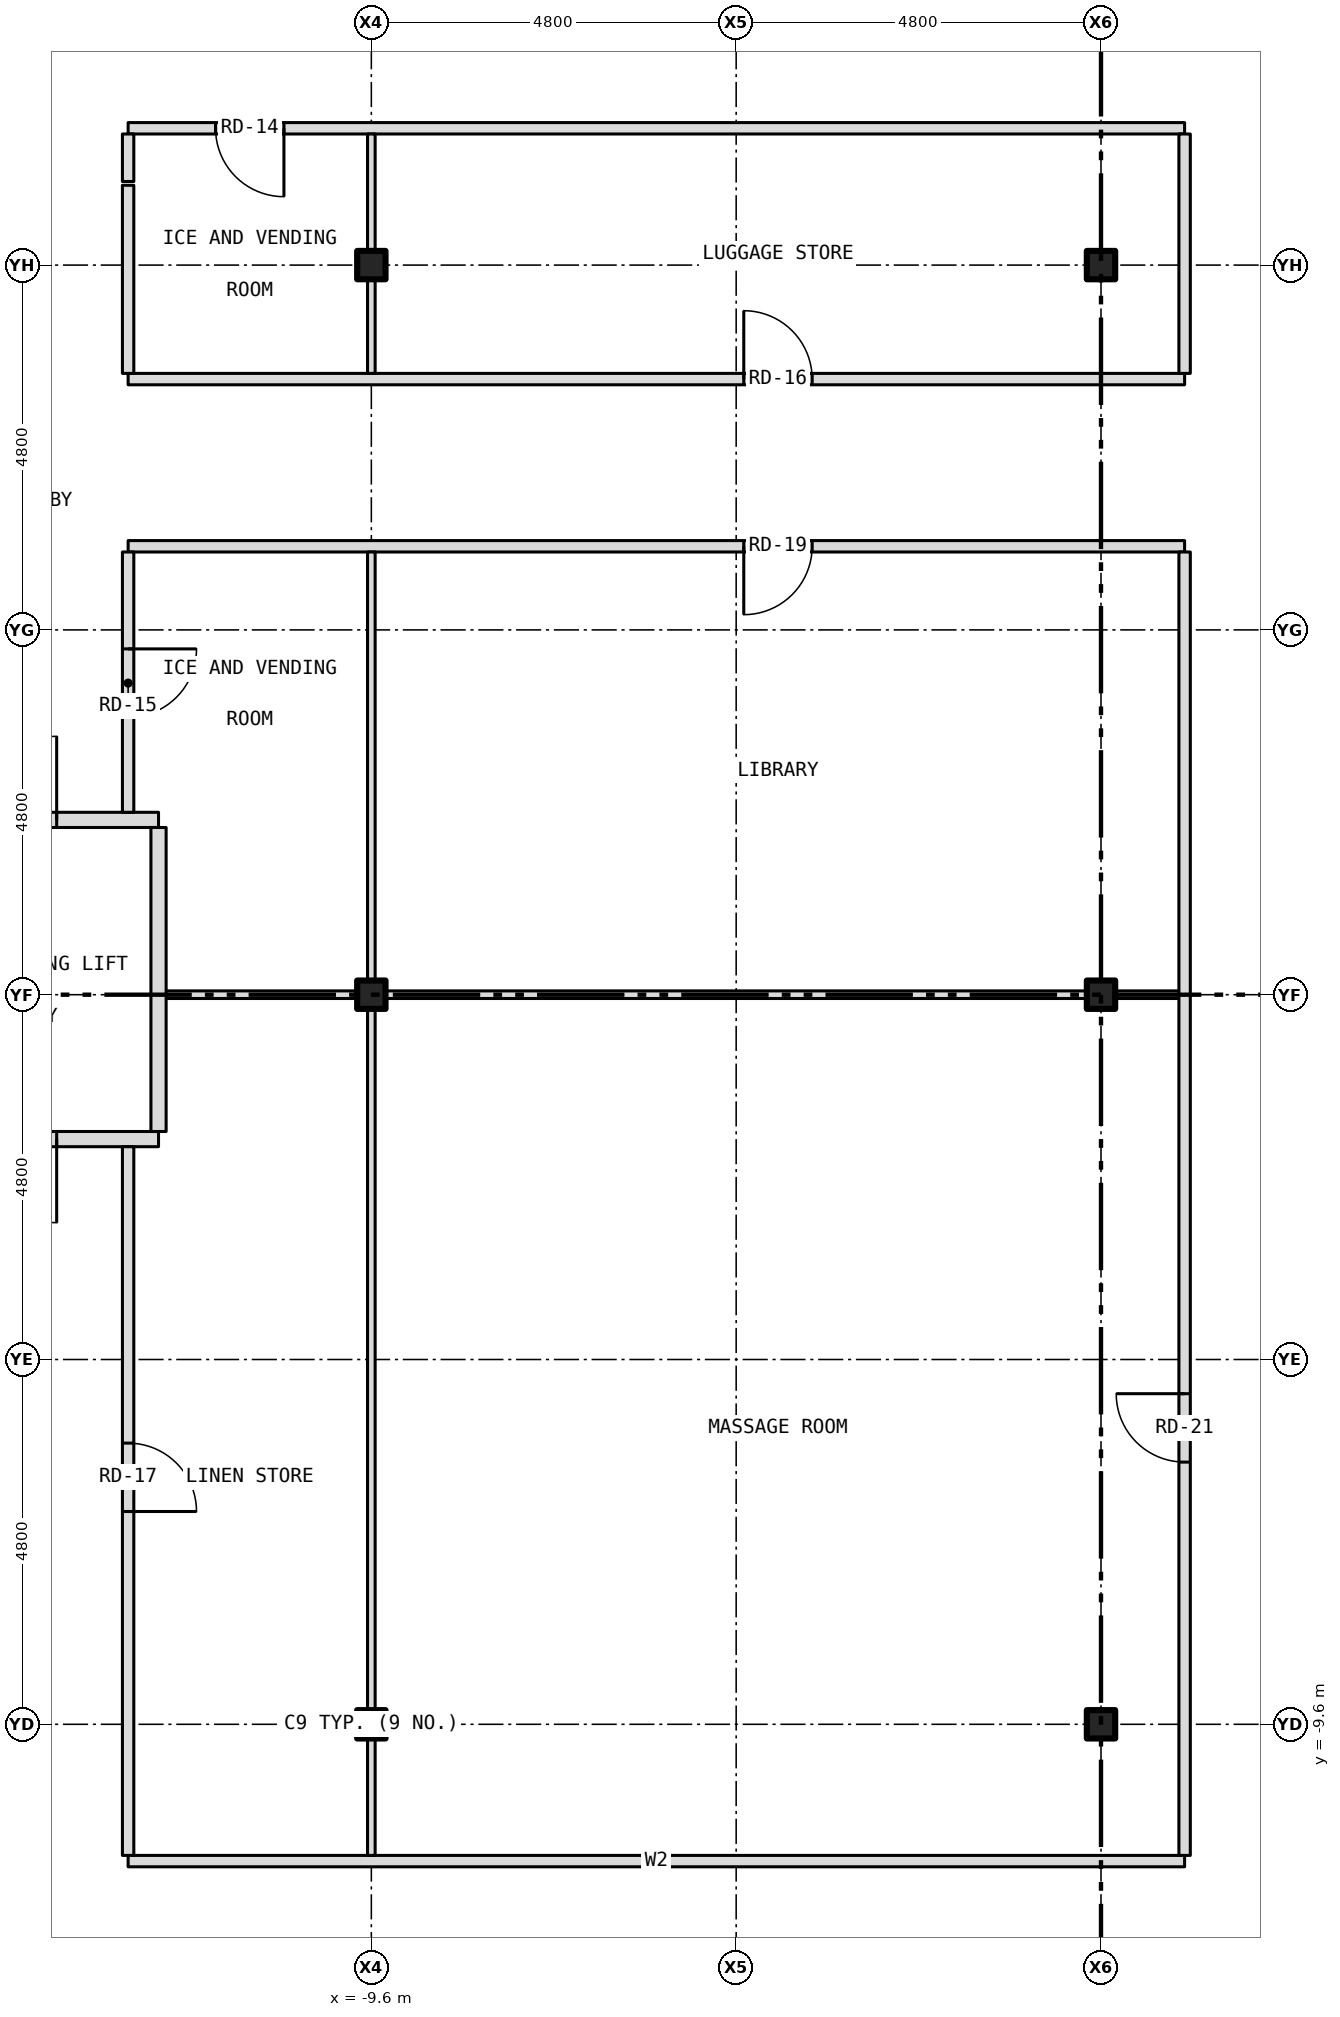
"""IFC4 building model, lengths in metres.
Left out: names, types, materials, properties, quantities, classifications, styles, units other than length and angle.
Written with IfcOpenShell. Run it as: python <this file> out.ifc"""

import sys

from ifc_helpers import new_model, si_unit, direction, frame, frame_2d, origin, origin_2d, place, context, subcontext, project, spatial, rectangle, i_section, extrude, element, fill, save


model = new_model("IFC4")
c1 = context("Model", 3, precision=1e-05, world=origin(), true_north=direction((0.0, 1.0)))
c2 = subcontext(c1, "Body", "Model", "MODEL_VIEW")
j1 = project(units=[si_unit("LENGTHUNIT", "METRE"), si_unit("PLANEANGLEUNIT", "RADIAN")], contexts=[c1])
p1 = place(None, origin())
s1 = spatial("IfcSite", under=j1, at=p1, CompositionType="ELEMENT")
p2 = place(p1, origin())
s2 = spatial("IfcBuilding", under=s1, at=p2, CompositionType="ELEMENT")
p3 = place(p2, frame((0.0, 0.0, 165.5)))
s3 = spatial("IfcBuildingStorey", under=s2, at=p3, CompositionType="ELEMENT", Elevation=165.5)
for number, where, z_axis, x_axis in (
    (1, (-9.6, -9.6, -0.15), (0.0, 0.0, 1.0), (1.0, 0.0, 0.0)),
    (2, (-9.6, 0.0, -0.15), (0.0, 0.0, 1.0), (1.0, 0.0, 0.0)),
    (3, (-9.6, 9.6, -0.15), (0.0, 0.0, 1.0), (1.0, 0.0, 0.0)),
    (4, (0.0, -9.6, -0.15), (0.0, 0.0, 1.0), (1.0, 0.0, 0.0)),
    (5, (0.0, 0.0, -0.15), (0.0, 0.0, 1.0), (1.0, 0.0, 0.0)),
    (6, (0.0, 9.6, -0.15), (0.0, 0.0, 1.0), (1.0, 0.0, 0.0)),
):
    element("IfcColumn", number, at=place(p3, frame(where, z_axis=z_axis, x_axis=x_axis)), inside=s3, PredefinedType="COLUMN", context=c2, shape_type="SweptSolid", body=[
        extrude(i_section(OverallWidth=0.373, OverallDepth=0.373, WebThickness=0.016, FlangeThickness=0.026, at=origin_2d()), origin(), (0.0, 0.0, 1.0), 3.5),
    ])
p4 = place(p3, frame((-12.8, -11.4, 0.0), z_axis=(0.0, 0.0, 1.0), x_axis=(1.0, 0.0, 0.0)))
e7 = element("IfcWall", 7, at=p4, inside=s3, PredefinedType="PARTITIONING", context=c2, shape_type="SweptSolid", body=[
    extrude(rectangle(XDim=13.9, YDim=0.15, at=frame_2d((6.95, 0.0))), origin(), (0.0, 0.0, 1.0), 3.35),
])
p5 = place(p3, frame((-15.68, -1.9, 0.0), z_axis=(0.0, 0.0, 1.0), x_axis=(1.0, 0.0, 0.0)))
e8 = element("IfcWall", 8, at=p5, inside=s3, PredefinedType="PARTITIONING", context=c2, shape_type="SweptSolid", body=[
    extrude(rectangle(XDim=3.28, YDim=0.2, at=frame_2d((1.64, 0.0))), origin(), (0.0, 0.0, 1.0), 3.35),
])
p6 = place(p5, frame((0.84, 0.0, 0.0)))
e9 = element("IfcOpeningElement", 9, at=p6, cuts=e8, PredefinedType="OPENING", context=c2, shape_type="SweptSolid", body=[
    extrude(rectangle(XDim=1.1, YDim=2.1, at=frame_2d((0.55, 1.05))), frame((0.0, 0.112, 0.0), z_axis=(0.0, -1.0, 0.0), x_axis=(1.0, 0.0, 0.0)), (0.0, 0.0, 1.0), 0.224),
])
p7 = place(p3, frame((-12.4, 0.0, 0.0), z_axis=(0.0, 0.0, 1.0), x_axis=(1.0, 0.0, 0.0)))
e10 = element("IfcWall", 10, at=p7, inside=s3, PredefinedType="PARTITIONING", context=c2, shape_type="SweptSolid", body=[
    extrude(rectangle(XDim=2.613, YDim=0.1, at=frame_2d((1.306, 0.0))), origin(), (0.0, 0.0, 1.0), 2.728),
])
p8 = place(p3, frame((-9.787, 0.0, 0.0), z_axis=(0.0, 0.0, 1.0), x_axis=(1.0, 0.0, 0.0)))
e11 = element("IfcWall", 11, at=p8, inside=s3, PredefinedType="PARTITIONING", context=c2, shape_type="SweptSolid", body=[
    extrude(rectangle(XDim=0.374, YDim=0.1, at=frame_2d((0.187, 0.0))), origin(), (0.0, 0.0, 1.0), 3.35),
])
p9 = place(p3, frame((-9.413, 0.0, 0.0), z_axis=(0.0, 0.0, 1.0), x_axis=(1.0, 0.0, 0.0)))
e12 = element("IfcWall", 12, at=p9, inside=s3, PredefinedType="PARTITIONING", context=c2, shape_type="SweptSolid", body=[
    extrude(rectangle(XDim=9.226, YDim=0.1, at=frame_2d((4.613, 0.0))), origin(), (0.0, 0.0, 1.0), 2.728),
])
p10 = place(p3, frame((-0.187, 0.0, 0.0), z_axis=(0.0, 0.0, 1.0), x_axis=(1.0, 0.0, 0.0)))
e13 = element("IfcWall", 13, at=p10, inside=s3, PredefinedType="PARTITIONING", context=c2, shape_type="SweptSolid", body=[
    extrude(rectangle(XDim=0.374, YDim=0.1, at=frame_2d((0.187, 0.0))), origin(), (0.0, 0.0, 1.0), 3.35),
])
p11 = place(p3, frame((0.187, 0.0, 0.0), z_axis=(0.0, 0.0, 1.0), x_axis=(1.0, 0.0, 0.0)))
e14 = element("IfcWall", 14, at=p11, inside=s3, PredefinedType="PARTITIONING", context=c2, shape_type="SweptSolid", body=[
    extrude(rectangle(XDim=0.913, YDim=0.1, at=frame_2d((0.457, 0.0))), origin(), (0.0, 0.0, 1.0), 2.728),
])
p12 = place(p3, frame((-15.68, 2.3, 0.0), z_axis=(0.0, 0.0, 1.0), x_axis=(1.0, 0.0, 0.0)))
e15 = element("IfcWall", 15, at=p12, inside=s3, PredefinedType="PARTITIONING", context=c2, shape_type="SweptSolid", body=[
    extrude(rectangle(XDim=3.28, YDim=0.2, at=frame_2d((1.64, 0.0))), origin(), (0.0, 0.0, 1.0), 3.35),
])
p13 = place(p12, frame((0.84, 0.0, 0.0)))
e16 = element("IfcOpeningElement", 16, at=p13, cuts=e15, PredefinedType="OPENING", context=c2, shape_type="SweptSolid", body=[
    extrude(rectangle(XDim=1.1, YDim=2.1, at=frame_2d((0.55, 1.05))), frame((0.0, 0.112, 0.0), z_axis=(0.0, -1.0, 0.0), x_axis=(1.0, 0.0, 0.0)), (0.0, 0.0, 1.0), 0.224),
])
p14 = place(p3, frame((-12.8, 5.9, 0.0), z_axis=(0.0, 0.0, 1.0), x_axis=(1.0, 0.0, 0.0)))
e17 = element("IfcWall", 17, at=p14, inside=s3, PredefinedType="PARTITIONING", context=c2, shape_type="SweptSolid", body=[
    extrude(rectangle(XDim=13.9, YDim=0.15, at=frame_2d((6.95, 0.0))), origin(), (0.0, 0.0, 1.0), 3.35),
])
p15 = place(p14, frame((8.1, 0.0, 0.0)))
e18 = element("IfcOpeningElement", 18, at=p15, cuts=e17, PredefinedType="OPENING", context=c2, shape_type="SweptSolid", body=[
    extrude(rectangle(XDim=0.9, YDim=2.1, at=frame_2d((0.45, 1.05))), frame((0.0, 0.087, 0.0), z_axis=(0.0, -1.0, 0.0), x_axis=(1.0, 0.0, 0.0)), (0.0, 0.0, 1.0), 0.174),
])
p16 = place(p3, frame((-12.8, 8.1, 0.0), z_axis=(0.0, 0.0, 1.0), x_axis=(1.0, 0.0, 0.0)))
e19 = element("IfcWall", 19, at=p16, inside=s3, PredefinedType="PARTITIONING", context=c2, shape_type="SweptSolid", body=[
    extrude(rectangle(XDim=13.9, YDim=0.15, at=frame_2d((6.95, 0.0))), origin(), (0.0, 0.0, 1.0), 3.35),
])
p17 = place(p16, frame((8.1, 0.0, 0.0)))
e20 = element("IfcOpeningElement", 20, at=p17, cuts=e19, PredefinedType="OPENING", context=c2, shape_type="SweptSolid", body=[
    extrude(rectangle(XDim=0.9, YDim=2.1, at=frame_2d((0.45, 1.05))), frame((0.0, 0.087, 0.0), z_axis=(0.0, -1.0, 0.0), x_axis=(1.0, 0.0, 0.0)), (0.0, 0.0, 1.0), 0.174),
])
p18 = place(p3, frame((-12.8, 11.4, 0.0), z_axis=(0.0, 0.0, 1.0), x_axis=(1.0, 0.0, 0.0)))
e21 = element("IfcWall", 21, at=p18, inside=s3, PredefinedType="PARTITIONING", context=c2, shape_type="SweptSolid", body=[
    extrude(rectangle(XDim=13.9, YDim=0.15, at=frame_2d((6.95, 0.0))), origin(), (0.0, 0.0, 1.0), 3.35),
])
p19 = place(p18, frame((1.15, 0.0, 0.0)))
e22 = element("IfcOpeningElement", 22, at=p19, cuts=e21, PredefinedType="OPENING", context=c2, shape_type="SweptSolid", body=[
    extrude(rectangle(XDim=0.9, YDim=2.1, at=frame_2d((0.45, 1.05))), frame((0.0, 0.087, 0.0), z_axis=(0.0, -1.0, 0.0), x_axis=(1.0, 0.0, 0.0)), (0.0, 0.0, 1.0), 0.174),
])
p20 = place(p3, frame((-12.8, -11.325, 0.0), z_axis=(0.0, 0.0, 1.0), x_axis=(0.0, 1.0, 0.0)))
e23 = element("IfcWall", 23, at=p20, inside=s3, PredefinedType="PARTITIONING", context=c2, shape_type="SweptSolid", body=[
    extrude(rectangle(XDim=9.325, YDim=0.15, at=frame_2d((4.663, 0.0))), origin(), (0.0, 0.0, 1.0), 3.35),
])
p21 = place(p20, frame((4.525, 0.0, 0.0)))
e24 = element("IfcOpeningElement", 24, at=p21, cuts=e23, PredefinedType="OPENING", context=c2, shape_type="SweptSolid", body=[
    extrude(rectangle(XDim=0.9, YDim=2.1, at=frame_2d((0.45, 1.05))), frame((0.0, 0.087, 0.0), z_axis=(0.0, -1.0, 0.0), x_axis=(1.0, 0.0, 0.0)), (0.0, 0.0, 1.0), 0.174),
])
p22 = place(p3, frame((-12.8, 2.4, 0.0), z_axis=(0.0, 0.0, 1.0), x_axis=(0.0, 1.0, 0.0)))
e25 = element("IfcWall", 25, at=p22, inside=s3, PredefinedType="PARTITIONING", context=c2, shape_type="SweptSolid", body=[
    extrude(rectangle(XDim=3.425, YDim=0.15, at=frame_2d((1.712, 0.0))), origin(), (0.0, 0.0, 1.0), 3.35),
])
p23 = place(p22, frame((1.25, 0.0, 0.0)))
e26 = element("IfcOpeningElement", 26, at=p23, cuts=e25, PredefinedType="OPENING", context=c2, shape_type="SweptSolid", body=[
    extrude(rectangle(XDim=0.9, YDim=2.1, at=frame_2d((0.45, 1.05))), frame((0.0, 0.087, 0.0), z_axis=(0.0, -1.0, 0.0), x_axis=(1.0, 0.0, 0.0)), (0.0, 0.0, 1.0), 0.174),
])
p24 = place(p3, frame((-12.8, 8.175, 0.0), z_axis=(0.0, 0.0, 1.0), x_axis=(0.0, 1.0, 0.0)))
e27 = element("IfcWall", 27, at=p24, inside=s3, PredefinedType="PARTITIONING", context=c2, shape_type="SweptSolid", body=[
    extrude(rectangle(XDim=2.475, YDim=0.15, at=frame_2d((1.237, 0.0))), origin(), (0.0, 0.0, 1.0), 3.35),
])
p25 = place(p3, frame((-12.8, 10.7, 0.0), z_axis=(0.0, 0.0, 1.0), x_axis=(0.0, 1.0, 0.0)))
e28 = element("IfcWall", 28, at=p25, inside=s3, PredefinedType="PARTITIONING", context=c2, shape_type="SweptSolid", body=[
    extrude(rectangle(XDim=0.625, YDim=0.15, at=frame_2d((0.312, 0.0))), origin(), (0.0, 0.0, 1.0), 3.35),
])
p26 = place(p3, frame((-12.4, -1.8, 0.0), z_axis=(0.0, 0.0, 1.0), x_axis=(0.0, 1.0, 0.0)))
e29 = element("IfcWall", 29, at=p26, inside=s3, PredefinedType="PARTITIONING", context=c2, shape_type="SweptSolid", body=[
    extrude(rectangle(XDim=4.0, YDim=0.2, at=frame_2d((2.0, 0.0))), origin(), (0.0, 0.0, 1.0), 3.35),
])
p27 = place(p3, frame((-9.6, -11.325, 0.0), z_axis=(0.0, 0.0, 1.0), x_axis=(0.0, 1.0, 0.0)))
e30 = element("IfcWall", 30, at=p27, inside=s3, PredefinedType="PARTITIONING", context=c2, shape_type="SweptSolid", body=[
    extrude(rectangle(XDim=1.538, YDim=0.1, at=frame_2d((0.769, 0.0))), origin(), (0.0, 0.0, 1.0), 2.728),
])
p28 = place(p3, frame((-9.6, -9.787, 0.0), z_axis=(0.0, 0.0, 1.0), x_axis=(0.0, 1.0, 0.0)))
e31 = element("IfcWall", 31, at=p28, inside=s3, PredefinedType="PARTITIONING", context=c2, shape_type="SweptSolid", body=[
    extrude(rectangle(XDim=0.374, YDim=0.1, at=frame_2d((0.187, 0.0))), origin(), (0.0, 0.0, 1.0), 3.35),
])
p29 = place(p3, frame((-9.6, -9.413, 0.0), z_axis=(0.0, 0.0, 1.0), x_axis=(0.0, 1.0, 0.0)))
e32 = element("IfcWall", 32, at=p29, inside=s3, PredefinedType="PARTITIONING", context=c2, shape_type="SweptSolid", body=[
    extrude(rectangle(XDim=9.363, YDim=0.1, at=frame_2d((4.682, 0.0))), origin(), (0.0, 0.0, 1.0), 2.728),
])
p30 = place(p3, frame((-9.6, 0.05, 0.0), z_axis=(0.0, 0.0, 1.0), x_axis=(0.0, 1.0, 0.0)))
e33 = element("IfcWall", 33, at=p30, inside=s3, PredefinedType="PARTITIONING", context=c2, shape_type="SweptSolid", body=[
    extrude(rectangle(XDim=5.775, YDim=0.1, at=frame_2d((2.887, 0.0))), origin(), (0.0, 0.0, 1.0), 2.728),
])
p31 = place(p3, frame((-9.6, 8.175, 0.0), z_axis=(0.0, 0.0, 1.0), x_axis=(0.0, 1.0, 0.0)))
e34 = element("IfcWall", 34, at=p31, inside=s3, PredefinedType="PARTITIONING", context=c2, shape_type="SweptSolid", body=[
    extrude(rectangle(XDim=1.238, YDim=0.1, at=frame_2d((0.619, 0.0))), origin(), (0.0, 0.0, 1.0), 2.728),
])
p32 = place(p3, frame((-9.6, 9.413, 0.0), z_axis=(0.0, 0.0, 1.0), x_axis=(0.0, 1.0, 0.0)))
e35 = element("IfcWall", 35, at=p32, inside=s3, PredefinedType="PARTITIONING", context=c2, shape_type="SweptSolid", body=[
    extrude(rectangle(XDim=0.374, YDim=0.1, at=frame_2d((0.187, 0.0))), origin(), (0.0, 0.0, 1.0), 3.35),
])
p33 = place(p3, frame((-9.6, 9.787, 0.0), z_axis=(0.0, 0.0, 1.0), x_axis=(0.0, 1.0, 0.0)))
e36 = element("IfcWall", 36, at=p33, inside=s3, PredefinedType="PARTITIONING", context=c2, shape_type="SweptSolid", body=[
    extrude(rectangle(XDim=1.538, YDim=0.1, at=frame_2d((0.769, 0.0))), origin(), (0.0, 0.0, 1.0), 2.728),
])
p34 = place(p3, frame((1.1, -11.325, 0.0), z_axis=(0.0, 0.0, 1.0), x_axis=(0.0, 1.0, 0.0)))
e37 = element("IfcWall", 37, at=p34, inside=s3, PredefinedType="PARTITIONING", context=c2, shape_type="SweptSolid", body=[
    extrude(rectangle(XDim=17.15, YDim=0.15, at=frame_2d((8.575, 0.0))), origin(), (0.0, 0.0, 1.0), 3.35),
])
p35 = place(p34, frame((5.175, 0.0, 0.0)))
e38 = element("IfcOpeningElement", 38, at=p35, cuts=e37, PredefinedType="OPENING", context=c2, shape_type="SweptSolid", body=[
    extrude(rectangle(XDim=0.9, YDim=2.1, at=frame_2d((0.45, 1.05))), frame((0.0, 0.087, 0.0), z_axis=(0.0, -1.0, 0.0), x_axis=(1.0, 0.0, 0.0)), (0.0, 0.0, 1.0), 0.174),
])
p36 = place(p3, frame((1.1, 8.175, 0.0), z_axis=(0.0, 0.0, 1.0), x_axis=(0.0, 1.0, 0.0)))
e39 = element("IfcWall", 39, at=p36, inside=s3, PredefinedType="PARTITIONING", context=c2, shape_type="SweptSolid", body=[
    extrude(rectangle(XDim=3.15, YDim=0.15, at=frame_2d((1.575, 0.0))), origin(), (0.0, 0.0, 1.0), 3.35),
])
p37 = place(p13, origin())
e40 = element("IfcDoor", 40, at=p37, inside=s3, OperationType="SINGLE_SWING_RIGHT", PredefinedType="DOOR", context=c2, shape_type="SweptSolid", body=[
    extrude(rectangle(XDim=1.1, YDim=2.1, at=frame_2d((0.55, 1.05))), frame((0.0, 0.025, 0.0), z_axis=(0.0, -1.0, 0.0), x_axis=(1.0, 0.0, 0.0)), (0.0, 0.0, 1.0), 0.05),
])
fill(e16, e40)
p38 = place(p6, origin())
e41 = element("IfcDoor", 41, at=p38, inside=s3, OperationType="SINGLE_SWING_RIGHT", PredefinedType="DOOR", context=c2, shape_type="SweptSolid", body=[
    extrude(rectangle(XDim=1.1, YDim=2.1, at=frame_2d((0.55, 1.05))), frame((0.0, 0.025, 0.0), z_axis=(0.0, -1.0, 0.0), x_axis=(1.0, 0.0, 0.0)), (0.0, 0.0, 1.0), 0.05),
])
fill(e9, e41)
p39 = place(p19, origin())
e42 = element("IfcDoor", 42, at=p39, inside=s3, OperationType="SINGLE_SWING_RIGHT", PredefinedType="DOOR", context=c2, shape_type="SweptSolid", body=[
    extrude(rectangle(XDim=0.9, YDim=2.1, at=frame_2d((0.45, 1.05))), frame((0.0, 0.025, 0.0), z_axis=(0.0, -1.0, 0.0), x_axis=(1.0, 0.0, 0.0)), (0.0, 0.0, 1.0), 0.05),
])
fill(e22, e42)
p40 = place(p23, origin())
e43 = element("IfcDoor", 43, at=p40, inside=s3, OperationType="SINGLE_SWING_RIGHT", PredefinedType="DOOR", context=c2, shape_type="SweptSolid", body=[
    extrude(rectangle(XDim=0.9, YDim=2.1, at=frame_2d((0.45, 1.05))), frame((0.0, 0.025, 0.0), z_axis=(0.0, -1.0, 0.0), x_axis=(1.0, 0.0, 0.0)), (0.0, 0.0, 1.0), 0.05),
])
fill(e26, e43)
p41 = place(p17, origin())
e44 = element("IfcDoor", 44, at=p41, inside=s3, OperationType="SINGLE_SWING_LEFT", PredefinedType="DOOR", context=c2, shape_type="SweptSolid", body=[
    extrude(rectangle(XDim=0.9, YDim=2.1, at=frame_2d((0.45, 1.05))), frame((0.0, 0.025, 0.0), z_axis=(0.0, -1.0, 0.0), x_axis=(1.0, 0.0, 0.0)), (0.0, 0.0, 1.0), 0.05),
])
fill(e20, e44)
p42 = place(p21, origin())
e45 = element("IfcDoor", 45, at=p42, inside=s3, OperationType="SINGLE_SWING_LEFT", PredefinedType="DOOR", context=c2, shape_type="SweptSolid", body=[
    extrude(rectangle(XDim=0.9, YDim=2.1, at=frame_2d((0.45, 1.05))), frame((0.0, 0.025, 0.0), z_axis=(0.0, -1.0, 0.0), x_axis=(1.0, 0.0, 0.0)), (0.0, 0.0, 1.0), 0.05),
])
fill(e24, e45)
p43 = place(p15, origin())
e46 = element("IfcDoor", 46, at=p43, inside=s3, OperationType="SINGLE_SWING_LEFT", PredefinedType="DOOR", context=c2, shape_type="SweptSolid", body=[
    extrude(rectangle(XDim=0.9, YDim=2.1, at=frame_2d((0.45, 1.05))), frame((0.0, 0.025, 0.0), z_axis=(0.0, -1.0, 0.0), x_axis=(1.0, 0.0, 0.0)), (0.0, 0.0, 1.0), 0.05),
])
fill(e18, e46)
p44 = place(p35, origin())
e47 = element("IfcDoor", 47, at=p44, inside=s3, OperationType="SINGLE_SWING_RIGHT", PredefinedType="DOOR", context=c2, shape_type="SweptSolid", body=[
    extrude(rectangle(XDim=0.9, YDim=2.1, at=frame_2d((0.45, 1.05))), frame((0.0, 0.025, 0.0), z_axis=(0.0, -1.0, 0.0), x_axis=(1.0, 0.0, 0.0)), (0.0, 0.0, 1.0), 0.05),
])
fill(e38, e47)
save(model, sys.argv[1])
